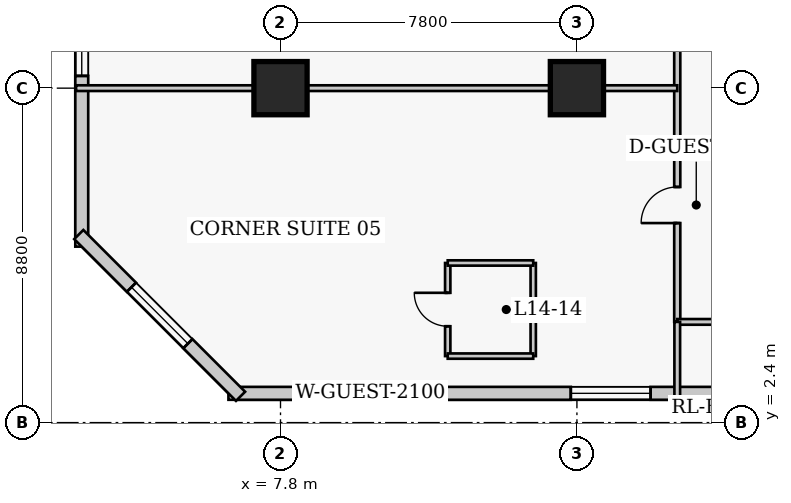
"""IFC4 building model, lengths in metres.
Left out: names, types, materials, properties, quantities, classifications, styles, units other than length and angle.
Written with IfcOpenShell. Run it as: python <this file> out.ifc"""

import sys

from ifc_helpers import new_model, si_unit, direction, frame, frame_2d, origin, origin_2d, place, context, subcontext, project, spatial, rectangle, extrude, element, fill, save


model = new_model("IFC4")
c1 = context("Model", 3, precision=1e-05, world=origin(), true_north=direction((0.0, 1.0)))
c2 = subcontext(c1, "Body", "Model", "MODEL_VIEW")
j1 = project(units=[si_unit("LENGTHUNIT", "METRE"), si_unit("PLANEANGLEUNIT", "RADIAN")], contexts=[c1])
p1 = place(None, origin())
s1 = spatial("IfcSite", under=j1, at=p1, CompositionType="ELEMENT")
p2 = place(p1, origin())
s2 = spatial("IfcBuilding", under=s1, at=p2, CompositionType="ELEMENT")
p3 = place(p2, frame((0.0, 0.0, 60.2)))
s3 = spatial("IfcBuildingStorey", under=s2, at=p3, CompositionType="ELEMENT", Elevation=60.2)
for number, where, z_axis, x_axis in (
    (1, (7.8, 11.2, 0.0), (0.0, 0.0, 1.0), (1.0, 0.0, 0.0)),
    (2, (15.6, 11.2, 0.0), (0.0, 0.0, 1.0), (1.0, 0.0, 0.0)),
):
    element("IfcColumn", number, at=place(p3, frame(where, z_axis=z_axis, x_axis=x_axis)), inside=s3, PredefinedType="COLUMN", context=c2, shape_type="SweptSolid", body=[
        extrude(rectangle(XDim=1.4, YDim=1.4, at=origin_2d()), origin(), (0.0, 0.0, 1.0), 3.8),
    ])
p4 = place(p3, frame((6.43, 3.17, 0.0), z_axis=(0.0, 0.0, 1.0), x_axis=(1.0, 0.0, 0.0)))
e3 = element("IfcWall", 3, at=p4, inside=s3, PredefinedType="SOLIDWALL", context=c2, shape_type="SweptSolid", body=[
    extrude(rectangle(XDim=29.89, YDim=0.34, at=frame_2d((14.945, 0.0))), origin(), (0.0, 0.0, 1.0), 3.54),
])
p5 = place(p4, frame((19.42, 0.0, 0.0)))
e4 = element("IfcOpeningElement", 4, at=p5, cuts=e3, PredefinedType="OPENING", context=c2, shape_type="SweptSolid", body=[
    extrude(rectangle(XDim=1.4, YDim=2.15, at=frame_2d((0.7, 1.075))), frame((0.0, 0.18, 0.0), z_axis=(0.0, -1.0, 0.0), x_axis=(1.0, 0.0, 0.0)), (0.0, 0.0, 1.0), 0.36),
])
p6 = place(p4, frame((2.686, 0.0, 0.85)))
e5 = element("IfcOpeningElement", 5, at=p6, cuts=e3, PredefinedType="OPENING", context=c2, shape_type="SweptSolid", body=[
    extrude(rectangle(XDim=2.1, YDim=1.85, at=frame_2d((1.05, 0.925))), frame((0.0, 0.18, 0.0), z_axis=(0.0, -1.0, 0.0), x_axis=(1.0, 0.0, 0.0)), (0.0, 0.0, 1.0), 0.36),
])
p7 = place(p4, frame((9.009, 0.0, 0.85)))
e6 = element("IfcOpeningElement", 6, at=p7, cuts=e3, PredefinedType="OPENING", context=c2, shape_type="SweptSolid", body=[
    extrude(rectangle(XDim=2.1, YDim=1.85, at=frame_2d((1.05, 0.925))), frame((0.0, 0.18, 0.0), z_axis=(0.0, -1.0, 0.0), x_axis=(1.0, 0.0, 0.0)), (0.0, 0.0, 1.0), 0.36),
])
p8 = place(p4, frame((25.104, 0.0, 0.85)))
e7 = element("IfcOpeningElement", 7, at=p8, cuts=e3, PredefinedType="OPENING", context=c2, shape_type="SweptSolid", body=[
    extrude(rectangle(XDim=2.1, YDim=1.85, at=frame_2d((1.05, 0.925))), frame((0.0, 0.18, 0.0), z_axis=(0.0, -1.0, 0.0), x_axis=(1.0, 0.0, 0.0)), (0.0, 0.0, 1.0), 0.36),
])
p9 = place(p3, frame((2.57, 42.17, 0.0), z_axis=(0.0, 0.0, 1.0), x_axis=(0.0, -1.0, 0.0)))
e8 = element("IfcWall", 8, at=p9, inside=s3, PredefinedType="SOLIDWALL", context=c2, shape_type="SweptSolid", body=[
    extrude(rectangle(XDim=35.14, YDim=0.34, at=frame_2d((17.57, 0.0))), origin(), (0.0, 0.0, 1.0), 3.54),
])
p10 = place(p9, frame((3.343, 0.0, 0.85)))
e9 = element("IfcOpeningElement", 9, at=p10, cuts=e8, PredefinedType="OPENING", context=c2, shape_type="SweptSolid", body=[
    extrude(rectangle(XDim=2.1, YDim=1.85, at=frame_2d((1.05, 0.925))), frame((0.0, 0.18, 0.0), z_axis=(0.0, -1.0, 0.0), x_axis=(1.0, 0.0, 0.0)), (0.0, 0.0, 1.0), 0.36),
])
p11 = place(p9, frame((10.978, 0.0, 0.85)))
e10 = element("IfcOpeningElement", 10, at=p11, cuts=e8, PredefinedType="OPENING", context=c2, shape_type="SweptSolid", body=[
    extrude(rectangle(XDim=2.1, YDim=1.85, at=frame_2d((1.05, 0.925))), frame((0.0, 0.18, 0.0), z_axis=(0.0, -1.0, 0.0), x_axis=(1.0, 0.0, 0.0)), (0.0, 0.0, 1.0), 0.36),
])
p12 = place(p9, frame((19.762, 0.0, 0.85)))
e11 = element("IfcOpeningElement", 11, at=p12, cuts=e8, PredefinedType="OPENING", context=c2, shape_type="SweptSolid", body=[
    extrude(rectangle(XDim=2.1, YDim=1.85, at=frame_2d((1.05, 0.925))), frame((0.0, 0.18, 0.0), z_axis=(0.0, -1.0, 0.0), x_axis=(1.0, 0.0, 0.0)), (0.0, 0.0, 1.0), 0.36),
])
p13 = place(p9, frame((28.548, 0.0, 0.85)))
e12 = element("IfcOpeningElement", 12, at=p13, cuts=e8, PredefinedType="OPENING", context=c2, shape_type="SweptSolid", body=[
    extrude(rectangle(XDim=2.1, YDim=1.85, at=frame_2d((1.05, 0.925))), frame((0.0, 0.18, 0.0), z_axis=(0.0, -1.0, 0.0), x_axis=(1.0, 0.0, 0.0)), (0.0, 0.0, 1.0), 0.36),
])
p14 = place(p3, frame((2.492, 7.348, 0.0), z_axis=(0.0, 0.0, 1.0), x_axis=(0.707106781187, -0.707106781187, 0.0)))
e13 = element("IfcWall", 13, at=p14, inside=s3, PredefinedType="SOLIDWALL", context=c2, shape_type="SweptSolid", body=[
    extrude(rectangle(XDim=6.02, YDim=0.34, at=frame_2d((3.01, 0.0))), origin(), (0.0, 0.0, 1.0), 3.54),
])
p15 = place(p14, frame((1.96, 0.0, 0.85)))
e14 = element("IfcOpeningElement", 14, at=p15, cuts=e13, PredefinedType="OPENING", context=c2, shape_type="SweptSolid", body=[
    extrude(rectangle(XDim=2.1, YDim=1.85, at=frame_2d((1.05, 0.925))), frame((0.0, 0.18, 0.0), z_axis=(0.0, -1.0, 0.0), x_axis=(1.0, 0.0, 0.0)), (0.0, 0.0, 1.0), 0.36),
])
p16 = place(p3, frame((18.24, 5.05, 0.0), z_axis=(0.0, 0.0, 1.0), x_axis=(0.0, 1.0, 0.0)))
e15 = element("IfcWall", 15, at=p16, inside=s3, PredefinedType="PARTITIONING", context=c2, shape_type="SweptSolid", body=[
    extrude(rectangle(XDim=35.6, YDim=0.16, at=frame_2d((17.8, 0.0))), origin(), (0.0, 0.0, 1.0), 3.54),
])
p17 = place(p16, frame((2.6, 0.0, 0.0)))
e16 = element("IfcOpeningElement", 16, at=p17, cuts=e15, PredefinedType="OPENING", context=c2, shape_type="SweptSolid", body=[
    extrude(rectangle(XDim=0.95, YDim=2.1, at=frame_2d((0.475, 1.05))), frame((0.0, 0.09, 0.0), z_axis=(0.0, -1.0, 0.0), x_axis=(1.0, 0.0, 0.0)), (0.0, 0.0, 1.0), 0.18),
])
p18 = place(p16, frame((10.075, 0.0, 0.0)))
e17 = element("IfcOpeningElement", 17, at=p18, cuts=e15, PredefinedType="OPENING", context=c2, shape_type="SweptSolid", body=[
    extrude(rectangle(XDim=0.95, YDim=2.1, at=frame_2d((0.475, 1.05))), frame((0.0, 0.09, 0.0), z_axis=(0.0, -1.0, 0.0), x_axis=(1.0, 0.0, 0.0)), (0.0, 0.0, 1.0), 0.18),
])
p19 = place(p16, frame((18.875, 0.0, 0.0)))
e18 = element("IfcOpeningElement", 18, at=p19, cuts=e15, PredefinedType="OPENING", context=c2, shape_type="SweptSolid", body=[
    extrude(rectangle(XDim=0.95, YDim=2.1, at=frame_2d((0.475, 1.05))), frame((0.0, 0.09, 0.0), z_axis=(0.0, -1.0, 0.0), x_axis=(1.0, 0.0, 0.0)), (0.0, 0.0, 1.0), 0.18),
])
p20 = place(p16, frame((26.575, 0.0, 0.0)))
e19 = element("IfcOpeningElement", 19, at=p20, cuts=e15, PredefinedType="OPENING", context=c2, shape_type="SweptSolid", body=[
    extrude(rectangle(XDim=0.95, YDim=2.1, at=frame_2d((0.475, 1.05))), frame((0.0, 0.09, 0.0), z_axis=(0.0, -1.0, 0.0), x_axis=(1.0, 0.0, 0.0)), (0.0, 0.0, 1.0), 0.18),
])
p21 = place(p16, frame((32.53, 0.0, 0.0)))
e20 = element("IfcOpeningElement", 20, at=p21, cuts=e15, PredefinedType="OPENING", context=c2, shape_type="SweptSolid", body=[
    extrude(rectangle(XDim=1.0, YDim=2.15, at=frame_2d((0.5, 1.075))), frame((0.0, 0.09, 0.0), z_axis=(0.0, -1.0, 0.0), x_axis=(1.0, 0.0, 0.0)), (0.0, 0.0, 1.0), 0.18),
])
p22 = place(p3, frame((18.24, 5.05, 0.0), z_axis=(0.0, 0.0, 1.0), x_axis=(1.0, 0.0, 0.0)))
e21 = element("IfcWall", 21, at=p22, inside=s3, PredefinedType="PARTITIONING", context=c2, shape_type="SweptSolid", body=[
    extrude(rectangle(XDim=2.22, YDim=0.15, at=frame_2d((1.11, 0.0))), origin(), (0.0, 0.0, 1.0), 3.54),
])
p23 = place(p3, frame((18.24, 3.02, 0.0), z_axis=(0.0, 0.0, 1.0), x_axis=(0.0, 1.0, 0.0)))
e22 = element("IfcWall", 22, at=p23, inside=s3, PredefinedType="PARTITIONING", context=c2, shape_type="SweptSolid", body=[
    extrude(rectangle(XDim=2.03, YDim=0.15, at=frame_2d((1.015, 0.0))), origin(), (0.0, 0.0, 1.0), 3.54),
])
p24 = place(p3, frame((12.2, 4.15, 0.0), z_axis=(0.0, 0.0, 1.0), x_axis=(0.0, 1.0, 0.0)))
e23 = element("IfcWall", 23, at=p24, inside=s3, PredefinedType="PLUMBINGWALL", context=c2, shape_type="SweptSolid", body=[
    extrude(rectangle(XDim=2.45, YDim=0.14, at=frame_2d((1.225, 0.0))), origin(), (0.0, 0.0, 1.0), 3.54),
])
p25 = place(p24, frame((0.785, 0.0, 0.0)))
e24 = element("IfcOpeningElement", 24, at=p25, cuts=e23, PredefinedType="OPENING", context=c2, shape_type="SweptSolid", body=[
    extrude(rectangle(XDim=0.88, YDim=2.05, at=frame_2d((0.44, 1.025))), frame((0.0, 0.08, 0.0), z_axis=(0.0, -1.0, 0.0), x_axis=(1.0, 0.0, 0.0)), (0.0, 0.0, 1.0), 0.16),
])
p26 = place(p3, frame((14.45, 4.15, 0.0), z_axis=(0.0, 0.0, 1.0), x_axis=(0.0, 1.0, 0.0)))
e25 = element("IfcWall", 25, at=p26, inside=s3, PredefinedType="PLUMBINGWALL", context=c2, shape_type="SweptSolid", body=[
    extrude(rectangle(XDim=2.45, YDim=0.14, at=frame_2d((1.225, 0.0))), origin(), (0.0, 0.0, 1.0), 3.54),
])
for number, where, z_axis, x_axis in (
    (26, (12.2, 4.15, 0.0), (0.0, 0.0, 1.0), (1.0, 0.0, 0.0)),
    (27, (12.2, 6.6, 0.0), (0.0, 0.0, 1.0), (1.0, 0.0, 0.0)),
):
    element("IfcWall", number, at=place(p3, frame(where, z_axis=z_axis, x_axis=x_axis)), inside=s3, PredefinedType="PLUMBINGWALL", context=c2, shape_type="SweptSolid", body=[
        extrude(rectangle(XDim=2.25, YDim=0.14, at=frame_2d((1.125, 0.0))), origin(), (0.0, 0.0, 1.0), 3.54),
    ])
p27 = place(p3, frame((2.42, 11.2, 0.0), z_axis=(0.0, 0.0, 1.0), x_axis=(1.0, 0.0, 0.0)))
e28 = element("IfcWall", 28, at=p27, inside=s3, PredefinedType="PARTITIONING", context=c2, shape_type="SweptSolid", body=[
    extrude(rectangle(XDim=15.82, YDim=0.15, at=frame_2d((7.91, 0.0))), origin(), (0.0, 0.0, 1.0), 2.593),
])
p28 = place(p6, origin())
e29 = element("IfcWindow", 29, at=p28, inside=s3, PartitioningType="SINGLE_PANEL", PredefinedType="WINDOW", context=c2, shape_type="SweptSolid", body=[
    extrude(rectangle(XDim=2.1, YDim=1.85, at=frame_2d((1.05, 0.925))), frame((0.0, 0.03, 0.0), z_axis=(0.0, -1.0, 0.0), x_axis=(1.0, 0.0, 0.0)), (0.0, 0.0, 1.0), 0.06),
])
fill(e5, e29)
p29 = place(p7, origin())
e30 = element("IfcWindow", 30, at=p29, inside=s3, PartitioningType="SINGLE_PANEL", PredefinedType="WINDOW", context=c2, shape_type="SweptSolid", body=[
    extrude(rectangle(XDim=2.1, YDim=1.85, at=frame_2d((1.05, 0.925))), frame((0.0, 0.03, 0.0), z_axis=(0.0, -1.0, 0.0), x_axis=(1.0, 0.0, 0.0)), (0.0, 0.0, 1.0), 0.06),
])
fill(e6, e30)
p30 = place(p13, origin())
e31 = element("IfcWindow", 31, at=p30, inside=s3, PartitioningType="SINGLE_PANEL", PredefinedType="WINDOW", context=c2, shape_type="SweptSolid", body=[
    extrude(rectangle(XDim=2.1, YDim=1.85, at=frame_2d((1.05, 0.925))), frame((0.0, 0.03, 0.0), z_axis=(0.0, -1.0, 0.0), x_axis=(1.0, 0.0, 0.0)), (0.0, 0.0, 1.0), 0.06),
])
fill(e12, e31)
p31 = place(p15, origin())
e32 = element("IfcWindow", 32, at=p31, inside=s3, PartitioningType="SINGLE_PANEL", PredefinedType="WINDOW", context=c2, shape_type="SweptSolid", body=[
    extrude(rectangle(XDim=2.1, YDim=1.85, at=frame_2d((1.05, 0.925))), frame((0.0, 0.03, 0.0), z_axis=(0.0, -1.0, 0.0), x_axis=(1.0, 0.0, 0.0)), (0.0, 0.0, 1.0), 0.06),
])
fill(e14, e32)
p32 = place(p25, origin())
e33 = element("IfcDoor", 33, at=p32, inside=s3, OperationType="SINGLE_SWING_RIGHT", PredefinedType="DOOR", context=c2, shape_type="SweptSolid", body=[
    extrude(rectangle(XDim=0.88, YDim=2.05, at=frame_2d((0.44, 1.025))), frame((0.0, 0.025, 0.0), z_axis=(0.0, -1.0, 0.0), x_axis=(1.0, 0.0, 0.0)), (0.0, 0.0, 1.0), 0.05),
])
fill(e24, e33)
p33 = place(p17, origin())
e34 = element("IfcDoor", 34, at=p33, inside=s3, OperationType="SINGLE_SWING_LEFT", PredefinedType="DOOR", context=c2, shape_type="SweptSolid", body=[
    extrude(rectangle(XDim=0.95, YDim=2.1, at=frame_2d((0.475, 1.05))), frame((0.0, 0.025, 0.0), z_axis=(0.0, -1.0, 0.0), x_axis=(1.0, 0.0, 0.0)), (0.0, 0.0, 1.0), 0.05),
])
fill(e16, e34)
save(model, sys.argv[1])
